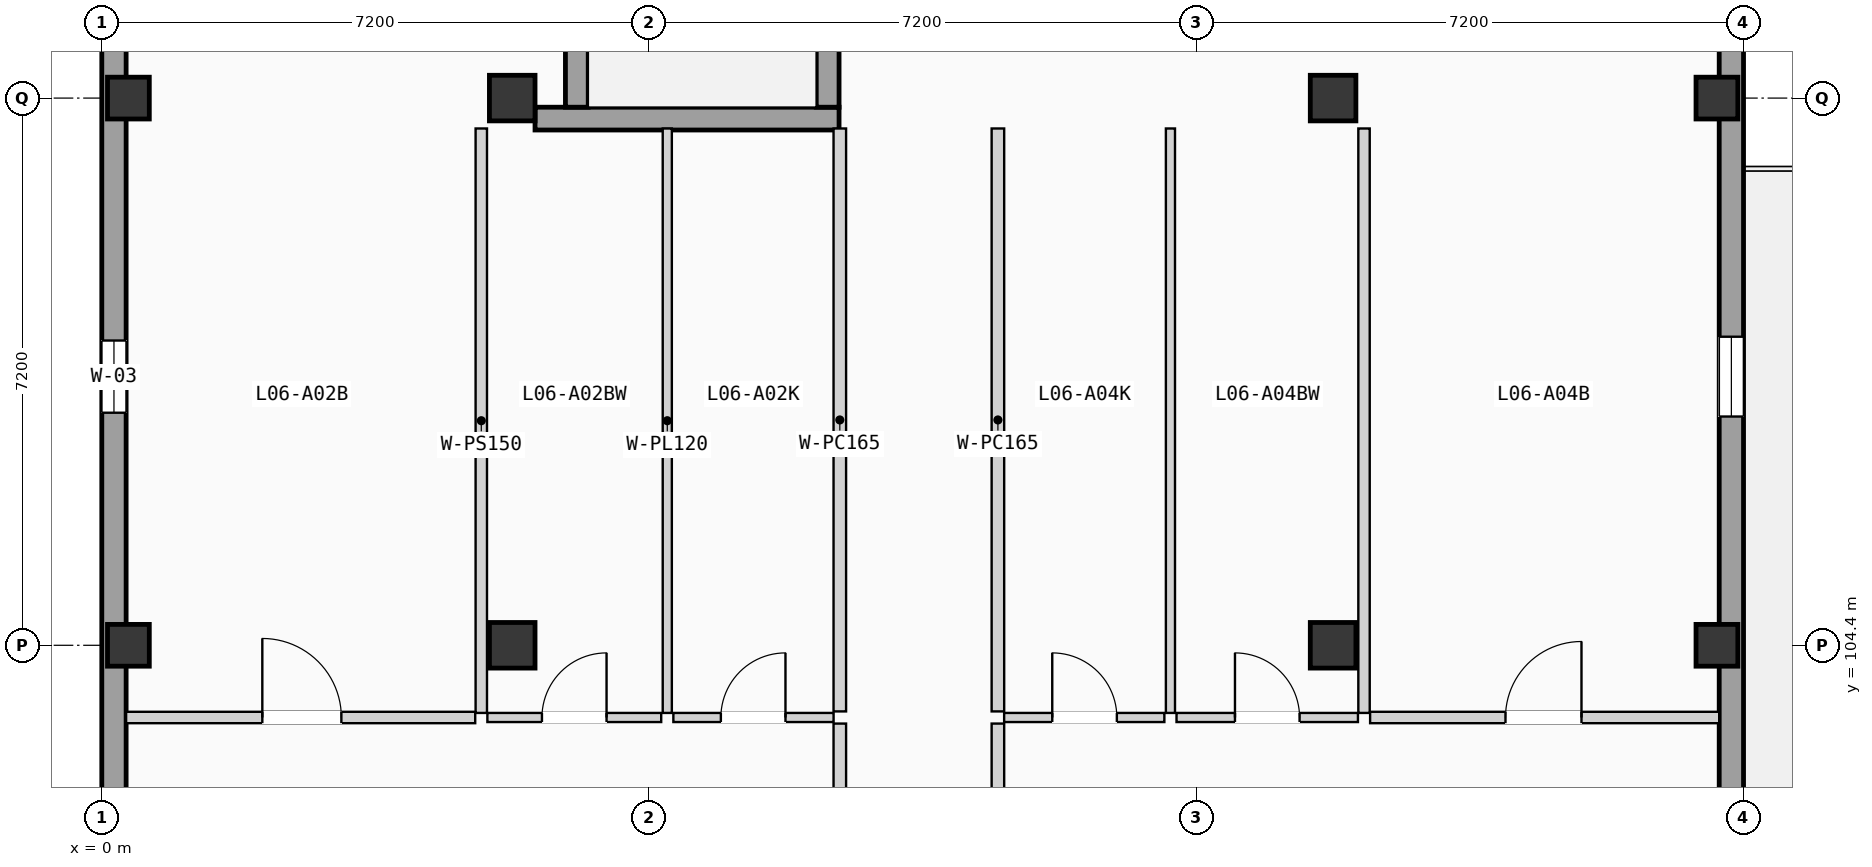
"""IFC4 building model, lengths in metres.
Left out: names, types, materials, properties, quantities, classifications, styles, units other than length and angle.
Written with IfcOpenShell. Run it as: python <this file> out.ifc"""

import sys

from ifc_helpers import new_model, si_unit, direction, frame, frame_2d, origin, origin_2d, place, context, subcontext, project, spatial, rectangle, extrude, element, fill, save


model = new_model("IFC4")
c1 = context("Model", 3, precision=1e-05, world=origin(), true_north=direction((0.0, 1.0)))
c2 = subcontext(c1, "Body", "Model", "MODEL_VIEW")
j1 = project(units=[si_unit("LENGTHUNIT", "METRE"), si_unit("PLANEANGLEUNIT", "RADIAN")], contexts=[c1])
p1 = place(None, origin())
s1 = spatial("IfcSite", under=j1, at=p1, CompositionType="ELEMENT")
p2 = place(p1, origin())
s2 = spatial("IfcBuilding", under=s1, at=p2, CompositionType="ELEMENT")
p3 = place(p2, frame((0.0, 0.0, 21.525)))
s3 = spatial("IfcBuildingStorey", under=s2, at=p3, CompositionType="ELEMENT", Elevation=21.525)
for number, where, z_axis, x_axis in (
    (1, (0.35, 104.4, 0.0), (0.0, 0.0, 1.0), (1.0, 0.0, 0.0)),
    (2, (0.35, 111.6, 0.0), (0.0, 0.0, 1.0), (1.0, 0.0, 0.0)),
):
    element("IfcColumn", number, at=place(p3, frame(where, z_axis=z_axis, x_axis=x_axis)), inside=s3, PredefinedType="COLUMN", context=c2, shape_type="SweptSolid", body=[
        extrude(rectangle(XDim=0.55, YDim=0.55, at=origin_2d()), origin(), (0.0, 0.0, 1.0), 3.15),
    ])
for number, where, z_axis, x_axis in (
    (3, (5.4, 104.4, 0.0), (0.0, 0.0, 1.0), (1.0, 0.0, 0.0)),
    (4, (5.4, 111.6, 0.0), (0.0, 0.0, 1.0), (1.0, 0.0, 0.0)),
    (5, (16.2, 104.4, 0.0), (0.0, 0.0, 1.0), (1.0, 0.0, 0.0)),
    (6, (16.2, 111.6, 0.0), (0.0, 0.0, 1.0), (1.0, 0.0, 0.0)),
):
    element("IfcColumn", number, at=place(p3, frame(where, z_axis=z_axis, x_axis=x_axis)), inside=s3, PredefinedType="COLUMN", context=c2, shape_type="SweptSolid", body=[
        extrude(rectangle(XDim=0.6, YDim=0.6, at=origin_2d()), origin(), (0.0, 0.0, 1.0), 3.15),
    ])
for number, where, z_axis, x_axis in (
    (7, (21.25, 104.4, 0.0), (0.0, 0.0, 1.0), (1.0, 0.0, 0.0)),
    (8, (21.25, 111.6, 0.0), (0.0, 0.0, 1.0), (1.0, 0.0, 0.0)),
):
    element("IfcColumn", number, at=place(p3, frame(where, z_axis=z_axis, x_axis=x_axis)), inside=s3, PredefinedType="COLUMN", context=c2, shape_type="SweptSolid", body=[
        extrude(rectangle(XDim=0.55, YDim=0.55, at=origin_2d()), origin(), (0.0, 0.0, 1.0), 3.15),
    ])
p4 = place(p3, frame((0.16, 68.72, 0.0), z_axis=(0.0, 0.0, 1.0), x_axis=(0.0, 1.0, 0.0)))
e9 = element("IfcWall", 9, at=p4, inside=s3, PredefinedType="SOLIDWALL", context=c2, shape_type="SweptSolid", body=[
    extrude(rectangle(XDim=49.76, YDim=0.32, at=frame_2d((24.88, 0.0))), origin(), (0.0, 0.0, 1.0), 2.89),
])
p5 = place(p4, frame((12.169, 0.0, 0.85)))
e10 = element("IfcOpeningElement", 10, at=p5, cuts=e9, PredefinedType="OPENING", context=c2, shape_type="SweptSolid", body=[
    extrude(rectangle(XDim=0.95, YDim=1.2, at=frame_2d((0.475, 0.6))), frame((0.0, 0.17, 0.0), z_axis=(0.0, -1.0, 0.0), x_axis=(1.0, 0.0, 0.0)), (0.0, 0.0, 1.0), 0.34),
])
p6 = place(p4, frame((8.149, 0.0, 0.555)))
e11 = element("IfcOpeningElement", 11, at=p6, cuts=e9, PredefinedType="OPENING", context=c2, shape_type="SweptSolid", body=[
    extrude(rectangle(XDim=2.3, YDim=1.65, at=frame_2d((1.15, 0.825))), frame((0.0, 0.17, 0.0), z_axis=(0.0, -1.0, 0.0), x_axis=(1.0, 0.0, 0.0)), (0.0, 0.0, 1.0), 0.34),
])
p7 = place(p4, frame((18.072, 0.0, 0.85)))
e12 = element("IfcOpeningElement", 12, at=p7, cuts=e9, PredefinedType="OPENING", context=c2, shape_type="SweptSolid", body=[
    extrude(rectangle(XDim=0.95, YDim=1.2, at=frame_2d((0.475, 0.6))), frame((0.0, 0.17, 0.0), z_axis=(0.0, -1.0, 0.0), x_axis=(1.0, 0.0, 0.0)), (0.0, 0.0, 1.0), 0.34),
])
p8 = place(p4, frame((31.225, 0.0, 0.9)))
e13 = element("IfcOpeningElement", 13, at=p8, cuts=e9, PredefinedType="OPENING", context=c2, shape_type="SweptSolid", body=[
    extrude(rectangle(XDim=0.95, YDim=1.2, at=frame_2d((0.475, 0.6))), frame((0.0, 0.17, 0.0), z_axis=(0.0, -1.0, 0.0), x_axis=(1.0, 0.0, 0.0)), (0.0, 0.0, 1.0), 0.34),
])
p9 = place(p4, frame((24.002, 0.0, 0.855)))
e14 = element("IfcOpeningElement", 14, at=p9, cuts=e9, PredefinedType="OPENING", context=c2, shape_type="SweptSolid", body=[
    extrude(rectangle(XDim=0.95, YDim=1.35, at=frame_2d((0.475, 0.675))), frame((0.0, 0.17, 0.0), z_axis=(0.0, -1.0, 0.0), x_axis=(1.0, 0.0, 0.0)), (0.0, 0.0, 1.0), 0.34),
])
p10 = place(p4, frame((38.74, 0.0, 0.705)))
e15 = element("IfcOpeningElement", 15, at=p10, cuts=e9, PredefinedType="OPENING", context=c2, shape_type="SweptSolid", body=[
    extrude(rectangle(XDim=0.95, YDim=1.5, at=frame_2d((0.475, 0.75))), frame((0.0, 0.17, 0.0), z_axis=(0.0, -1.0, 0.0), x_axis=(1.0, 0.0, 0.0)), (0.0, 0.0, 1.0), 0.34),
])
p11 = place(p3, frame((21.44, 68.72, 0.0), z_axis=(0.0, 0.0, 1.0), x_axis=(0.0, 1.0, 0.0)))
e16 = element("IfcWall", 16, at=p11, inside=s3, PredefinedType="SOLIDWALL", context=c2, shape_type="SweptSolid", body=[
    extrude(rectangle(XDim=49.76, YDim=0.32, at=frame_2d((24.88, 0.0))), origin(), (0.0, 0.0, 1.0), 2.89),
])
p12 = place(p11, frame((12.169, 0.0, 0.555)))
e17 = element("IfcOpeningElement", 17, at=p12, cuts=e16, PredefinedType="OPENING", context=c2, shape_type="SweptSolid", body=[
    extrude(rectangle(XDim=0.95, YDim=1.65, at=frame_2d((0.475, 0.825))), frame((0.0, 0.17, 0.0), z_axis=(0.0, -1.0, 0.0), x_axis=(1.0, 0.0, 0.0)), (0.0, 0.0, 1.0), 0.34),
])
p13 = place(p11, frame((8.825, 0.0, 0.85)))
e18 = element("IfcOpeningElement", 18, at=p13, cuts=e16, PredefinedType="OPENING", context=c2, shape_type="SweptSolid", body=[
    extrude(rectangle(XDim=0.95, YDim=1.2, at=frame_2d((0.475, 0.6))), frame((0.0, 0.17, 0.0), z_axis=(0.0, -1.0, 0.0), x_axis=(1.0, 0.0, 0.0)), (0.0, 0.0, 1.0), 0.34),
])
p14 = place(p11, frame((17.053, 0.0, 0.0)))
e19 = element("IfcOpeningElement", 19, at=p14, cuts=e16, PredefinedType="OPENING", context=c2, shape_type="SweptSolid", body=[
    extrude(rectangle(XDim=0.95, YDim=2.15, at=frame_2d((0.475, 1.075))), frame((0.0, 0.17, 0.0), z_axis=(0.0, -1.0, 0.0), x_axis=(1.0, 0.0, 0.0)), (0.0, 0.0, 1.0), 0.34),
])
p15 = place(p11, frame((32.365, 0.0, 0.0)))
e20 = element("IfcOpeningElement", 20, at=p15, cuts=e16, PredefinedType="OPENING", context=c2, shape_type="SweptSolid", body=[
    extrude(rectangle(XDim=1.08, YDim=2.18, at=frame_2d((0.54, 1.09))), frame((0.0, 0.17, 0.0), z_axis=(0.0, -1.0, 0.0), x_axis=(1.0, 0.0, 0.0)), (0.0, 0.0, 1.0), 0.34),
])
p16 = place(p11, frame((23.952, 0.0, 0.9)))
e21 = element("IfcOpeningElement", 21, at=p16, cuts=e16, PredefinedType="OPENING", context=c2, shape_type="SweptSolid", body=[
    extrude(rectangle(XDim=1.05, YDim=1.2, at=frame_2d((0.525, 0.6))), frame((0.0, 0.17, 0.0), z_axis=(0.0, -1.0, 0.0), x_axis=(1.0, 0.0, 0.0)), (0.0, 0.0, 1.0), 0.34),
])
p17 = place(p11, frame((38.69, 0.0, 0.855)))
e22 = element("IfcOpeningElement", 22, at=p17, cuts=e16, PredefinedType="OPENING", context=c2, shape_type="SweptSolid", body=[
    extrude(rectangle(XDim=1.05, YDim=1.35, at=frame_2d((0.525, 0.675))), frame((0.0, 0.17, 0.0), z_axis=(0.0, -1.0, 0.0), x_axis=(1.0, 0.0, 0.0)), (0.0, 0.0, 1.0), 0.34),
])
p18 = place(p3, frame((5.7, 111.33, 0.0), z_axis=(0.0, 0.0, 1.0), x_axis=(1.0, 0.0, 0.0)))
e23 = element("IfcWall", 23, at=p18, inside=s3, PredefinedType="SHEAR", context=c2, shape_type="SweptSolid", body=[
    extrude(rectangle(XDim=4.0, YDim=0.3, at=frame_2d((2.0, 0.0))), origin(), (0.0, 0.0, 1.0), 2.89),
])
p19 = place(p3, frame((6.25, 111.48, 0.0), z_axis=(0.0, 0.0, 1.0), x_axis=(0.0, 1.0, 0.0)))
e24 = element("IfcWall", 24, at=p19, inside=s3, PredefinedType="SHEAR", context=c2, shape_type="SweptSolid", body=[
    extrude(rectangle(XDim=7.0, YDim=0.3, at=frame_2d((3.5, 0.0))), origin(), (0.0, 0.0, 1.0), 2.89),
])
p20 = place(p3, frame((9.55, 111.48, 0.0), z_axis=(0.0, 0.0, 1.0), x_axis=(0.0, 1.0, 0.0)))
e25 = element("IfcWall", 25, at=p20, inside=s3, PredefinedType="SHEAR", context=c2, shape_type="SweptSolid", body=[
    extrude(rectangle(XDim=7.0, YDim=0.3, at=frame_2d((3.5, 0.0))), origin(), (0.0, 0.0, 1.0), 2.89),
])
p21 = place(p20, frame((5.625, 0.0, 0.0)))
e26 = element("IfcOpeningElement", 26, at=p21, cuts=e25, PredefinedType="OPENING", context=c2, shape_type="SweptSolid", body=[
    extrude(rectangle(XDim=1.15, YDim=2.12, at=frame_2d((0.575, 1.06))), frame((0.0, 0.16, 0.0), z_axis=(0.0, -1.0, 0.0), x_axis=(1.0, 0.0, 0.0)), (0.0, 0.0, 1.0), 0.32),
])
p22 = place(p3, frame((9.71, 96.284, 0.0), z_axis=(0.0, 0.0, 1.0), x_axis=(0.0, 1.0, 0.0)))
e27 = element("IfcWall", 27, at=p22, inside=s3, PredefinedType="PARTITIONING", context=c2, shape_type="SweptSolid", body=[
    extrude(rectangle(XDim=7.086, YDim=0.165, at=frame_2d((3.543, 0.0))), origin(), (0.0, 0.0, 1.0), 2.87),
])
p23 = place(p22, frame((3.053, 0.0, 0.0)))
e28 = element("IfcOpeningElement", 28, at=p23, cuts=e27, PredefinedType="OPENING", context=c2, shape_type="SweptSolid", body=[
    extrude(rectangle(XDim=0.98, YDim=2.08, at=frame_2d((0.49, 1.04))), frame((0.0, 0.093, 0.0), z_axis=(0.0, -1.0, 0.0), x_axis=(1.0, 0.0, 0.0)), (0.0, 0.0, 1.0), 0.185),
])
p24 = place(p3, frame((9.71, 103.53, 0.0), z_axis=(0.0, 0.0, 1.0), x_axis=(0.0, 1.0, 0.0)))
e29 = element("IfcWall", 29, at=p24, inside=s3, PredefinedType="PARTITIONING", context=c2, shape_type="SweptSolid", body=[
    extrude(rectangle(XDim=7.67, YDim=0.165, at=frame_2d((3.835, 0.0))), origin(), (0.0, 0.0, 1.0), 2.87),
])
p25 = place(p3, frame((11.79, 96.284, 0.0), z_axis=(0.0, 0.0, 1.0), x_axis=(0.0, 1.0, 0.0)))
e30 = element("IfcWall", 30, at=p25, inside=s3, PredefinedType="PARTITIONING", context=c2, shape_type="SweptSolid", body=[
    extrude(rectangle(XDim=7.086, YDim=0.165, at=frame_2d((3.543, 0.0))), origin(), (0.0, 0.0, 1.0), 2.87),
])
p26 = place(p25, frame((3.053, 0.0, 0.0)))
e31 = element("IfcOpeningElement", 31, at=p26, cuts=e30, PredefinedType="OPENING", context=c2, shape_type="SweptSolid", body=[
    extrude(rectangle(XDim=0.98, YDim=2.08, at=frame_2d((0.49, 1.04))), frame((0.0, 0.093, 0.0), z_axis=(0.0, -1.0, 0.0), x_axis=(1.0, 0.0, 0.0)), (0.0, 0.0, 1.0), 0.185),
])
p27 = place(p3, frame((11.79, 103.53, 0.0), z_axis=(0.0, 0.0, 1.0), x_axis=(0.0, 1.0, 0.0)))
e32 = element("IfcWall", 32, at=p27, inside=s3, PredefinedType="PARTITIONING", context=c2, shape_type="SweptSolid", body=[
    extrude(rectangle(XDim=7.67, YDim=0.165, at=frame_2d((3.835, 0.0))), origin(), (0.0, 0.0, 1.0), 2.87),
])
p28 = place(p3, frame((7.52, 103.45, 0.0), z_axis=(0.0, 0.0, 1.0), x_axis=(1.0, 0.0, 0.0)))
e33 = element("IfcWall", 33, at=p28, inside=s3, PredefinedType="PARTITIONING", context=c2, shape_type="SweptSolid", body=[
    extrude(rectangle(XDim=2.108, YDim=0.12, at=frame_2d((1.054, 0.0))), origin(), (0.0, 0.0, 1.0), 2.87),
])
p29 = place(p28, frame((0.625, 0.0, 0.0)))
e34 = element("IfcOpeningElement", 34, at=p29, cuts=e33, PredefinedType="OPENING", context=c2, shape_type="SweptSolid", body=[
    extrude(rectangle(XDim=0.85, YDim=2.01, at=frame_2d((0.425, 1.005))), frame((0.0, 0.07, 0.0), z_axis=(0.0, -1.0, 0.0), x_axis=(1.0, 0.0, 0.0)), (0.0, 0.0, 1.0), 0.14),
])
p30 = place(p3, frame((0.32, 103.45, 0.0), z_axis=(0.0, 0.0, 1.0), x_axis=(1.0, 0.0, 0.0)))
e35 = element("IfcWall", 35, at=p30, inside=s3, PredefinedType="PARTITIONING", context=c2, shape_type="SweptSolid", body=[
    extrude(rectangle(XDim=4.593, YDim=0.15, at=frame_2d((2.296, 0.0))), origin(), (0.0, 0.0, 1.0), 2.87),
])
p31 = place(p30, frame((1.792, 0.0, 0.0)))
e36 = element("IfcOpeningElement", 36, at=p31, cuts=e35, PredefinedType="OPENING", context=c2, shape_type="SweptSolid", body=[
    extrude(rectangle(XDim=1.04, YDim=2.08, at=frame_2d((0.52, 1.04))), frame((0.0, 0.085, 0.0), z_axis=(0.0, -1.0, 0.0), x_axis=(1.0, 0.0, 0.0)), (0.0, 0.0, 1.0), 0.17),
])
p32 = place(p3, frame((5.073, 103.45, 0.0), z_axis=(0.0, 0.0, 1.0), x_axis=(1.0, 0.0, 0.0)))
e37 = element("IfcWall", 37, at=p32, inside=s3, PredefinedType="PARTITIONING", context=c2, shape_type="SweptSolid", body=[
    extrude(rectangle(XDim=2.287, YDim=0.12, at=frame_2d((1.144, 0.0))), origin(), (0.0, 0.0, 1.0), 2.87),
])
p33 = place(p32, frame((0.718, 0.0, 0.0)))
e38 = element("IfcOpeningElement", 38, at=p33, cuts=e37, PredefinedType="OPENING", context=c2, shape_type="SweptSolid", body=[
    extrude(rectangle(XDim=0.85, YDim=2.01, at=frame_2d((0.425, 1.005))), frame((0.0, 0.07, 0.0), z_axis=(0.0, -1.0, 0.0), x_axis=(1.0, 0.0, 0.0)), (0.0, 0.0, 1.0), 0.14),
])
p34 = place(p3, frame((7.44, 103.51, 0.0), z_axis=(0.0, 0.0, 1.0), x_axis=(0.0, 1.0, 0.0)))
e39 = element("IfcWall", 39, at=p34, inside=s3, PredefinedType="PARTITIONING", context=c2, shape_type="SweptSolid", body=[
    extrude(rectangle(XDim=7.69, YDim=0.12, at=frame_2d((3.845, 0.0))), origin(), (0.0, 0.0, 1.0), 2.87),
])
p35 = place(p3, frame((4.993, 103.51, 0.0), z_axis=(0.0, 0.0, 1.0), x_axis=(0.0, 1.0, 0.0)))
e40 = element("IfcWall", 40, at=p35, inside=s3, PredefinedType="PARTITIONING", context=c2, shape_type="SweptSolid", body=[
    extrude(rectangle(XDim=7.69, YDim=0.15, at=frame_2d((3.845, 0.0))), origin(), (0.0, 0.0, 1.0), 2.87),
])
p36 = place(p3, frame((11.872, 103.45, 0.0), z_axis=(0.0, 0.0, 1.0), x_axis=(1.0, 0.0, 0.0)))
e41 = element("IfcWall", 41, at=p36, inside=s3, PredefinedType="PARTITIONING", context=c2, shape_type="SweptSolid", body=[
    extrude(rectangle(XDim=2.108, YDim=0.12, at=frame_2d((1.054, 0.0))), origin(), (0.0, 0.0, 1.0), 2.87),
])
p37 = place(p36, frame((0.633, 0.0, 0.0)))
e42 = element("IfcOpeningElement", 42, at=p37, cuts=e41, PredefinedType="OPENING", context=c2, shape_type="SweptSolid", body=[
    extrude(rectangle(XDim=0.85, YDim=2.01, at=frame_2d((0.425, 1.005))), frame((0.0, 0.07, 0.0), z_axis=(0.0, -1.0, 0.0), x_axis=(1.0, 0.0, 0.0)), (0.0, 0.0, 1.0), 0.14),
])
p38 = place(p3, frame((16.687, 103.45, 0.0), z_axis=(0.0, 0.0, 1.0), x_axis=(1.0, 0.0, 0.0)))
e43 = element("IfcWall", 43, at=p38, inside=s3, PredefinedType="PARTITIONING", context=c2, shape_type="SweptSolid", body=[
    extrude(rectangle(XDim=4.593, YDim=0.15, at=frame_2d((2.296, 0.0))), origin(), (0.0, 0.0, 1.0), 2.87),
])
p39 = place(p38, frame((1.781, 0.0, 0.0)))
e44 = element("IfcOpeningElement", 44, at=p39, cuts=e43, PredefinedType="OPENING", context=c2, shape_type="SweptSolid", body=[
    extrude(rectangle(XDim=1.0, YDim=2.06, at=frame_2d((0.5, 1.03))), frame((0.0, 0.085, 0.0), z_axis=(0.0, -1.0, 0.0), x_axis=(1.0, 0.0, 0.0)), (0.0, 0.0, 1.0), 0.17),
])
p40 = place(p3, frame((14.14, 103.45, 0.0), z_axis=(0.0, 0.0, 1.0), x_axis=(1.0, 0.0, 0.0)))
e45 = element("IfcWall", 45, at=p40, inside=s3, PredefinedType="PARTITIONING", context=c2, shape_type="SweptSolid", body=[
    extrude(rectangle(XDim=2.387, YDim=0.12, at=frame_2d((1.194, 0.0))), origin(), (0.0, 0.0, 1.0), 2.87),
])
p41 = place(p40, frame((0.769, 0.0, 0.0)))
e46 = element("IfcOpeningElement", 46, at=p41, cuts=e45, PredefinedType="OPENING", context=c2, shape_type="SweptSolid", body=[
    extrude(rectangle(XDim=0.85, YDim=2.01, at=frame_2d((0.425, 1.005))), frame((0.0, 0.07, 0.0), z_axis=(0.0, -1.0, 0.0), x_axis=(1.0, 0.0, 0.0)), (0.0, 0.0, 1.0), 0.14),
])
p42 = place(p3, frame((14.06, 103.51, 0.0), z_axis=(0.0, 0.0, 1.0), x_axis=(0.0, 1.0, 0.0)))
e47 = element("IfcWall", 47, at=p42, inside=s3, PredefinedType="PARTITIONING", context=c2, shape_type="SweptSolid", body=[
    extrude(rectangle(XDim=7.69, YDim=0.12, at=frame_2d((3.845, 0.0))), origin(), (0.0, 0.0, 1.0), 2.87),
])
p43 = place(p3, frame((16.607, 103.51, 0.0), z_axis=(0.0, 0.0, 1.0), x_axis=(0.0, 1.0, 0.0)))
e48 = element("IfcWall", 48, at=p43, inside=s3, PredefinedType="PARTITIONING", context=c2, shape_type="SweptSolid", body=[
    extrude(rectangle(XDim=7.69, YDim=0.15, at=frame_2d((3.845, 0.0))), origin(), (0.0, 0.0, 1.0), 2.87),
])
p44 = place(p10, origin())
e49 = element("IfcWindow", 49, at=p44, inside=s3, PartitioningType="SINGLE_PANEL", PredefinedType="WINDOW", context=c2, shape_type="SweptSolid", body=[
    extrude(rectangle(XDim=0.95, YDim=1.5, at=frame_2d((0.475, 0.75))), frame((0.0, 0.03, 0.0), z_axis=(0.0, -1.0, 0.0), x_axis=(1.0, 0.0, 0.0)), (0.0, 0.0, 1.0), 0.06),
])
fill(e15, e49)
p45 = place(p17, origin())
e50 = element("IfcWindow", 50, at=p45, inside=s3, PartitioningType="SINGLE_PANEL", PredefinedType="WINDOW", context=c2, shape_type="SweptSolid", body=[
    extrude(rectangle(XDim=1.05, YDim=1.35, at=frame_2d((0.525, 0.675))), frame((0.0, 0.03, 0.0), z_axis=(0.0, -1.0, 0.0), x_axis=(1.0, 0.0, 0.0)), (0.0, 0.0, 1.0), 0.06),
])
fill(e22, e50)
p46 = place(p29, origin())
e51 = element("IfcDoor", 51, at=p46, inside=s3, OperationType="SINGLE_SWING_RIGHT", PredefinedType="DOOR", context=c2, shape_type="SweptSolid", body=[
    extrude(rectangle(XDim=0.85, YDim=2.01, at=frame_2d((0.425, 1.005))), frame((0.0, 0.025, 0.0), z_axis=(0.0, -1.0, 0.0), x_axis=(1.0, 0.0, 0.0)), (0.0, 0.0, 1.0), 0.05),
])
fill(e34, e51)
p47 = place(p31, origin())
e52 = element("IfcDoor", 52, at=p47, inside=s3, OperationType="SINGLE_SWING_LEFT", PredefinedType="DOOR", context=c2, shape_type="SweptSolid", body=[
    extrude(rectangle(XDim=1.04, YDim=2.08, at=frame_2d((0.52, 1.04))), frame((0.0, 0.025, 0.0), z_axis=(0.0, -1.0, 0.0), x_axis=(1.0, 0.0, 0.0)), (0.0, 0.0, 1.0), 0.05),
])
fill(e36, e52)
p48 = place(p33, origin())
e53 = element("IfcDoor", 53, at=p48, inside=s3, OperationType="SINGLE_SWING_RIGHT", PredefinedType="DOOR", context=c2, shape_type="SweptSolid", body=[
    extrude(rectangle(XDim=0.85, YDim=2.01, at=frame_2d((0.425, 1.005))), frame((0.0, 0.025, 0.0), z_axis=(0.0, -1.0, 0.0), x_axis=(1.0, 0.0, 0.0)), (0.0, 0.0, 1.0), 0.05),
])
fill(e38, e53)
p49 = place(p37, origin())
e54 = element("IfcDoor", 54, at=p49, inside=s3, OperationType="SINGLE_SWING_LEFT", PredefinedType="DOOR", context=c2, shape_type="SweptSolid", body=[
    extrude(rectangle(XDim=0.85, YDim=2.01, at=frame_2d((0.425, 1.005))), frame((0.0, 0.025, 0.0), z_axis=(0.0, -1.0, 0.0), x_axis=(1.0, 0.0, 0.0)), (0.0, 0.0, 1.0), 0.05),
])
fill(e42, e54)
p50 = place(p39, origin())
e55 = element("IfcDoor", 55, at=p50, inside=s3, OperationType="SINGLE_SWING_RIGHT", PredefinedType="DOOR", context=c2, shape_type="SweptSolid", body=[
    extrude(rectangle(XDim=1.0, YDim=2.06, at=frame_2d((0.5, 1.03))), frame((0.0, 0.025, 0.0), z_axis=(0.0, -1.0, 0.0), x_axis=(1.0, 0.0, 0.0)), (0.0, 0.0, 1.0), 0.05),
])
fill(e44, e55)
p51 = place(p41, origin())
e56 = element("IfcDoor", 56, at=p51, inside=s3, OperationType="SINGLE_SWING_LEFT", PredefinedType="DOOR", context=c2, shape_type="SweptSolid", body=[
    extrude(rectangle(XDim=0.85, YDim=2.01, at=frame_2d((0.425, 1.005))), frame((0.0, 0.025, 0.0), z_axis=(0.0, -1.0, 0.0), x_axis=(1.0, 0.0, 0.0)), (0.0, 0.0, 1.0), 0.05),
])
fill(e46, e56)
save(model, sys.argv[1])
